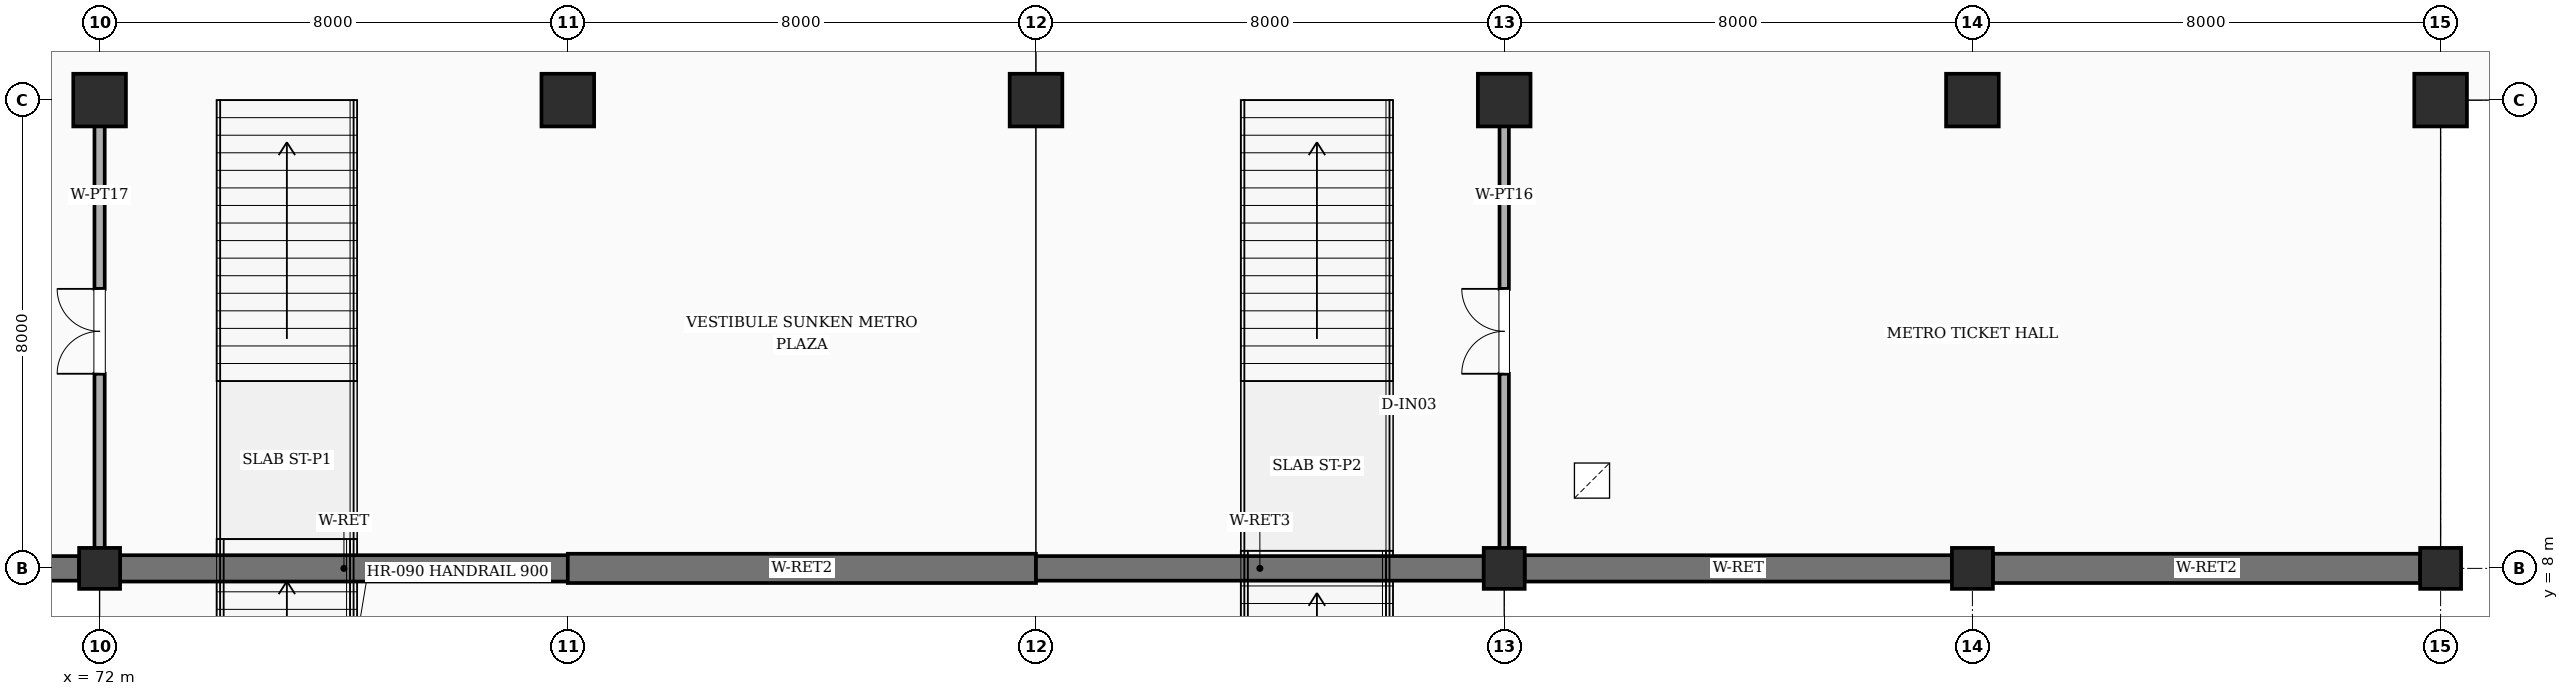
"""IFC4 building model, lengths in metres.
Left out: names, types, materials, properties, quantities, classifications, styles, units other than length and angle.
Written with IfcOpenShell. Run it as: python <this file> out.ifc"""

import sys

from ifc_helpers import new_model, si_unit, direction, frame, frame_2d, origin, origin_2d, place, context, subcontext, project, spatial, rectangle, extrude, element, fill, save


model = new_model("IFC4")
c1 = context("Model", 3, precision=1e-05, world=origin(), true_north=direction((0.0, 1.0)))
c2 = subcontext(c1, "Body", "Model", "MODEL_VIEW")
j1 = project(units=[si_unit("LENGTHUNIT", "METRE"), si_unit("PLANEANGLEUNIT", "RADIAN")], contexts=[c1])
p1 = place(None, origin())
s1 = spatial("IfcSite", under=j1, at=p1, CompositionType="ELEMENT")
p2 = place(p1, origin())
s2 = spatial("IfcBuilding", under=s1, at=p2, CompositionType="ELEMENT")
p3 = place(p2, frame((0.0, 0.0, -5.4)))
s3 = spatial("IfcBuildingStorey", under=s2, at=p3, CompositionType="ELEMENT", Elevation=-5.4)
for number, where, z_axis, x_axis in (
    (1, (72.0, 8.0, -0.4), (0.0, 0.0, 1.0), (1.0, 0.0, 0.0)),
    (2, (96.0, 8.0, -0.4), (0.0, 0.0, 1.0), (1.0, 0.0, 0.0)),
    (3, (104.0, 8.0, -0.4), (0.0, 0.0, 1.0), (1.0, 0.0, 0.0)),
    (4, (112.0, 8.0, -0.4), (0.0, 0.0, 1.0), (1.0, 0.0, 0.0)),
):
    element("IfcColumn", number, at=place(p3, frame(where, z_axis=z_axis, x_axis=x_axis)), inside=s3, PredefinedType="COLUMN", context=c2, shape_type="SweptSolid", body=[
        extrude(rectangle(XDim=0.7, YDim=0.7, at=origin_2d()), origin(), (0.0, 0.0, 1.0), 5.8),
    ])
for number, where, z_axis, x_axis in (
    (5, (72.0, 16.0, -0.4), (0.0, 0.0, 1.0), (1.0, 0.0, 0.0)),
    (6, (80.0, 16.0, -0.4), (0.0, 0.0, 1.0), (1.0, 0.0, 0.0)),
    (7, (88.0, 16.0, -0.4), (0.0, 0.0, 1.0), (1.0, 0.0, 0.0)),
    (8, (96.0, 16.0, -0.4), (0.0, 0.0, 1.0), (1.0, 0.0, 0.0)),
    (9, (104.0, 16.0, -0.4), (0.0, 0.0, 1.0), (1.0, 0.0, 0.0)),
    (10, (112.0, 16.0, -0.4), (0.0, 0.0, 1.0), (1.0, 0.0, 0.0)),
):
    element("IfcColumn", number, at=place(p3, frame(where, z_axis=z_axis, x_axis=x_axis)), inside=s3, PredefinedType="COLUMN", context=c2, shape_type="SweptSolid", body=[
        extrude(rectangle(XDim=0.9, YDim=0.9, at=origin_2d()), origin(), (0.0, 0.0, 1.0), 5.8),
    ])
p4 = place(p3, frame((64.35, 8.0, 0.0), z_axis=(0.0, 0.0, 1.0), x_axis=(1.0, 0.0, 0.0)))
e11 = element("IfcWall", 11, at=p4, inside=s3, PredefinedType="USERDEFINED", context=c2, shape_type="SweptSolid", body=[
    extrude(rectangle(XDim=7.3, YDim=0.42, at=frame_2d((3.65, 0.0))), origin(), (0.0, 0.0, 1.0), 5.0),
])
p5 = place(p3, frame((72.35, 8.0, 0.0), z_axis=(0.0, 0.0, 1.0), x_axis=(1.0, 0.0, 0.0)))
e12 = element("IfcWall", 12, at=p5, inside=s3, PredefinedType="USERDEFINED", context=c2, shape_type="SweptSolid", body=[
    extrude(rectangle(XDim=7.65, YDim=0.45, at=frame_2d((3.825, 0.0))), origin(), (0.0, 0.0, 1.0), 5.0),
])
p6 = place(p3, frame((80.0, 8.0, 0.0), z_axis=(0.0, 0.0, 1.0), x_axis=(1.0, 0.0, 0.0)))
e13 = element("IfcWall", 13, at=p6, inside=s3, PredefinedType="USERDEFINED", context=c2, shape_type="SweptSolid", body=[
    extrude(rectangle(XDim=8.0, YDim=0.5, at=frame_2d((4.0, 0.0))), origin(), (0.0, 0.0, 1.0), 5.0),
])
p7 = place(p3, frame((88.0, 8.0, 0.0), z_axis=(0.0, 0.0, 1.0), x_axis=(1.0, 0.0, 0.0)))
e14 = element("IfcWall", 14, at=p7, inside=s3, PredefinedType="USERDEFINED", context=c2, shape_type="SweptSolid", body=[
    extrude(rectangle(XDim=7.65, YDim=0.42, at=frame_2d((3.825, 0.0))), origin(), (0.0, 0.0, 1.0), 5.0),
])
p8 = place(p3, frame((96.35, 8.0, 0.0), z_axis=(0.0, 0.0, 1.0), x_axis=(1.0, 0.0, 0.0)))
e15 = element("IfcWall", 15, at=p8, inside=s3, PredefinedType="USERDEFINED", context=c2, shape_type="SweptSolid", body=[
    extrude(rectangle(XDim=7.3, YDim=0.45, at=frame_2d((3.65, 0.0))), origin(), (0.0, 0.0, 1.0), 5.0),
])
p9 = place(p3, frame((104.35, 8.0, 0.0), z_axis=(0.0, 0.0, 1.0), x_axis=(1.0, 0.0, 0.0)))
e16 = element("IfcWall", 16, at=p9, inside=s3, PredefinedType="USERDEFINED", context=c2, shape_type="SweptSolid", body=[
    extrude(rectangle(XDim=7.3, YDim=0.5, at=frame_2d((3.65, 0.0))), origin(), (0.0, 0.0, 1.0), 4.11),
])
p10 = place(p3, frame((72.0, 8.12, 0.0), z_axis=(0.0, 0.0, 1.0), x_axis=(0.0, 1.0, 0.0)))
e17 = element("IfcWall", 17, at=p10, inside=s3, PredefinedType="PARTITIONING", context=c2, shape_type="SweptSolid", body=[
    extrude(rectangle(XDim=7.86, YDim=0.175, at=frame_2d((3.93, 0.0))), origin(), (0.0, 0.0, 1.0), 5.0),
])
p11 = place(p10, frame((3.205, 0.0, 0.0)))
e18 = element("IfcOpeningElement", 18, at=p11, cuts=e17, PredefinedType="OPENING", context=c2, shape_type="SweptSolid", body=[
    extrude(rectangle(XDim=1.45, YDim=2.2, at=frame_2d((0.725, 1.1))), frame((0.0, 0.097, 0.0), z_axis=(0.0, -1.0, 0.0), x_axis=(1.0, 0.0, 0.0)), (0.0, 0.0, 1.0), 0.195),
])
p12 = place(p3, frame((96.0, 8.12, 0.0), z_axis=(0.0, 0.0, 1.0), x_axis=(0.0, 1.0, 0.0)))
e19 = element("IfcWall", 19, at=p12, inside=s3, PredefinedType="PARTITIONING", context=c2, shape_type="SweptSolid", body=[
    extrude(rectangle(XDim=7.86, YDim=0.16, at=frame_2d((3.93, 0.0))), origin(), (0.0, 0.0, 1.0), 5.0),
])
p13 = place(p12, frame((3.205, 0.0, 0.0)))
e20 = element("IfcOpeningElement", 20, at=p13, cuts=e19, PredefinedType="OPENING", context=c2, shape_type="SweptSolid", body=[
    extrude(rectangle(XDim=1.45, YDim=2.2, at=frame_2d((0.725, 1.1))), frame((0.0, 0.09, 0.0), z_axis=(0.0, -1.0, 0.0), x_axis=(1.0, 0.0, 0.0)), (0.0, 0.0, 1.0), 0.18),
])
p14 = place(p11, origin())
e21 = element("IfcDoor", 21, at=p14, inside=s3, OperationType="DOUBLE_DOOR_SINGLE_SWING", PredefinedType="DOOR", context=c2, shape_type="SweptSolid", body=[
    extrude(rectangle(XDim=1.45, YDim=2.2, at=frame_2d((0.725, 1.1))), frame((0.0, 0.025, 0.0), z_axis=(0.0, -1.0, 0.0), x_axis=(1.0, 0.0, 0.0)), (0.0, 0.0, 1.0), 0.05),
])
fill(e18, e21)
p15 = place(p13, origin())
e22 = element("IfcDoor", 22, at=p15, inside=s3, OperationType="DOUBLE_DOOR_SINGLE_SWING", PredefinedType="DOOR", context=c2, shape_type="SweptSolid", body=[
    extrude(rectangle(XDim=1.45, YDim=2.2, at=frame_2d((0.725, 1.1))), frame((0.0, 0.025, 0.0), z_axis=(0.0, -1.0, 0.0), x_axis=(1.0, 0.0, 0.0)), (0.0, 0.0, 1.0), 0.05),
])
fill(e20, e22)
save(model, sys.argv[1])
